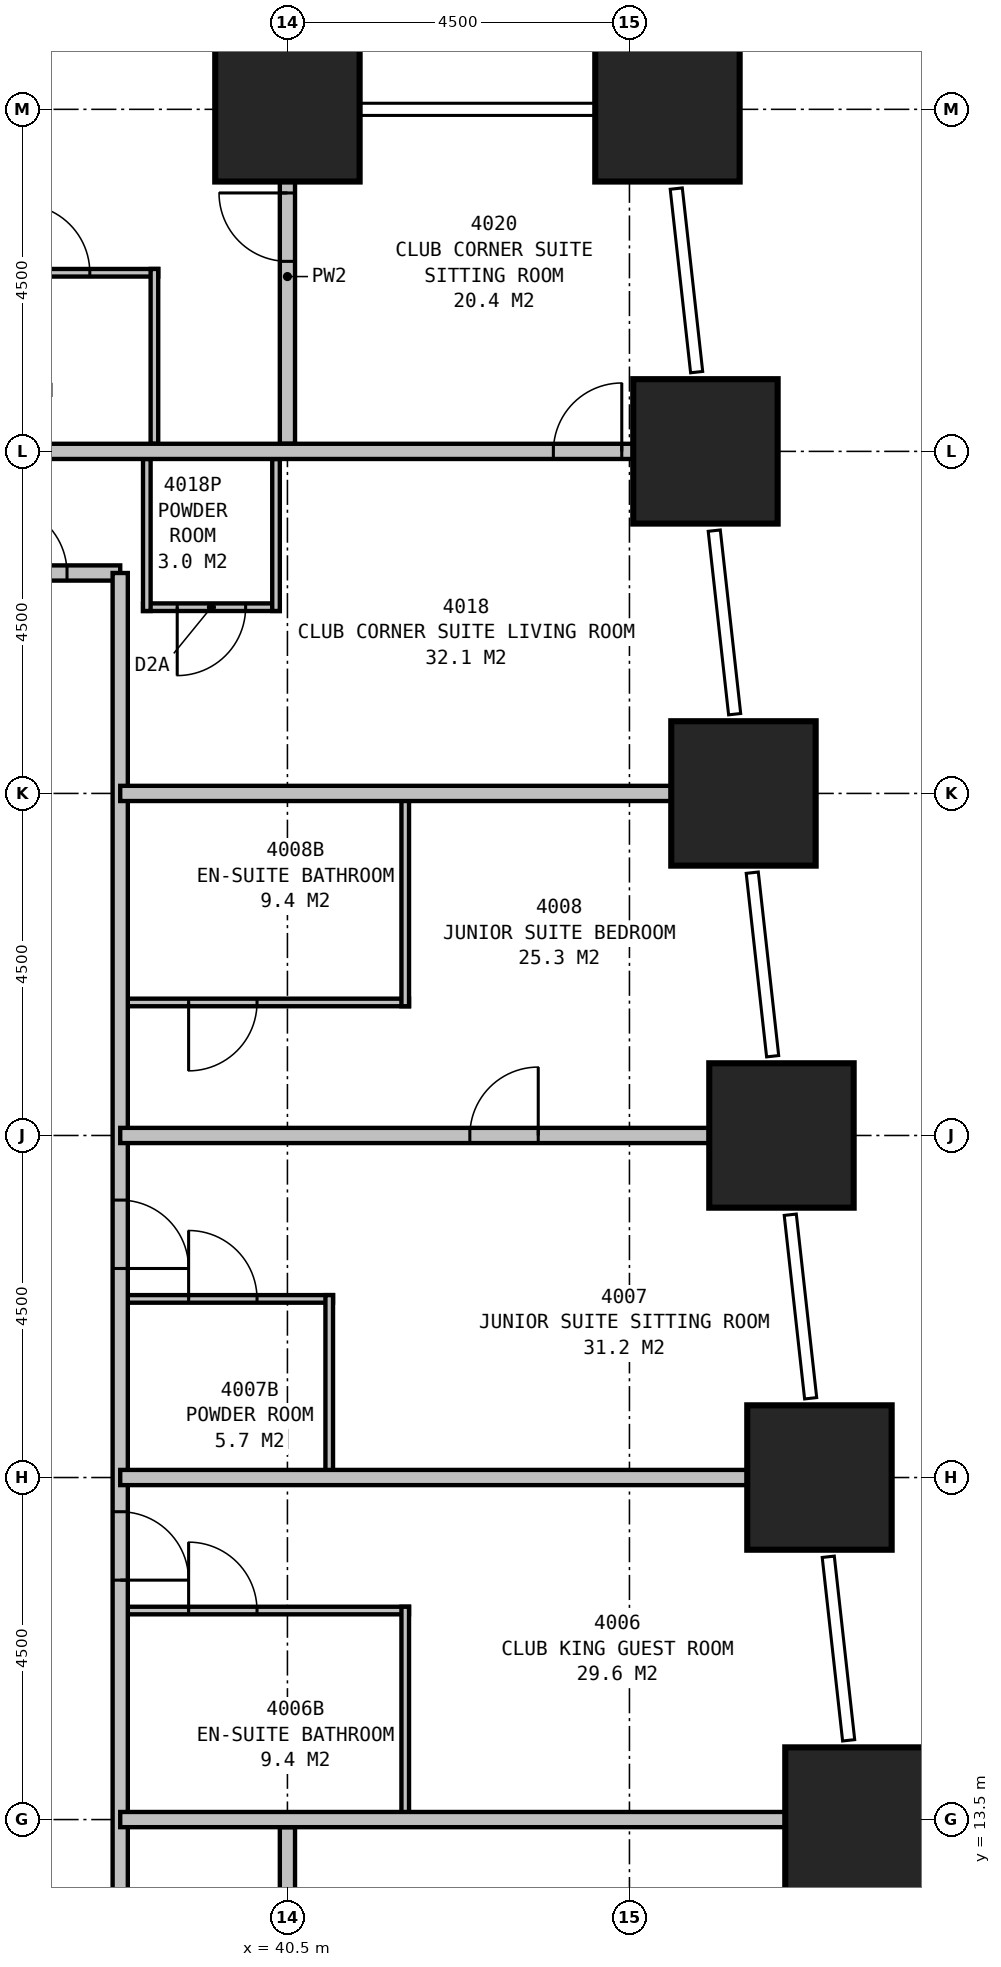
"""IFC4 building model, lengths in metres.
Left out: names, types, materials, properties, quantities, classifications, styles, units other than length and angle.
Written with IfcOpenShell. Run it as: python <this file> out.ifc"""

import sys

from ifc_helpers import new_model, si_unit, direction, frame, frame_2d, origin, origin_2d, place, context, subcontext, project, spatial, rectangle, extrude, element, fill, save


model = new_model("IFC4")
c1 = context("Model", 3, precision=1e-05, world=origin(), true_north=direction((0.0, 1.0)))
c2 = subcontext(c1, "Body", "Model", "MODEL_VIEW")
j1 = project(units=[si_unit("LENGTHUNIT", "METRE"), si_unit("PLANEANGLEUNIT", "RADIAN")], contexts=[c1])
p1 = place(None, origin())
s1 = spatial("IfcSite", under=j1, at=p1, CompositionType="ELEMENT")
p2 = place(p1, origin())
s2 = spatial("IfcBuilding", under=s1, at=p2, CompositionType="ELEMENT")
p3 = place(p2, frame((0.0, 0.0, 157.9)))
s3 = spatial("IfcBuildingStorey", under=s2, at=p3, CompositionType="ELEMENT", Elevation=157.9)
for number, where, z_axis, x_axis in (
    (1, (48.0, 13.5, 0.0), (0.0, 0.0, 1.0), (1.0, 0.0, 0.0)),
    (2, (47.5, 18.0, 0.0), (0.0, 0.0, 1.0), (1.0, 0.0, 0.0)),
    (3, (47.0, 22.5, 0.0), (0.0, 0.0, 1.0), (1.0, 0.0, 0.0)),
    (4, (46.5, 27.0, 0.0), (0.0, 0.0, 1.0), (1.0, 0.0, 0.0)),
    (5, (46.0, 31.5, 0.0), (0.0, 0.0, 1.0), (1.0, 0.0, 0.0)),
    (6, (45.5, 36.0, 0.0), (0.0, 0.0, 1.0), (1.0, 0.0, 0.0)),
    (7, (40.5, 36.0, 0.0), (0.0, 0.0, 1.0), (1.0, 0.0, 0.0)),
):
    element("IfcColumn", number, at=place(p3, frame(where, z_axis=z_axis, x_axis=x_axis)), inside=s3, PredefinedType="COLUMN", context=c2, shape_type="SweptSolid", body=[
        extrude(rectangle(XDim=1.9, YDim=1.9, at=origin_2d()), origin(), (0.0, 0.0, 1.0), 4.5),
    ])
p4 = place(p3, frame((11.2, 29.9, 0.0), z_axis=(0.0, 0.0, 1.0), x_axis=(1.0, 0.0, 0.0)))
e8 = element("IfcWall", 8, at=p4, inside=s3, PredefinedType="PARTITIONING", context=c2, shape_type="SweptSolid", body=[
    extrude(rectangle(XDim=27.1, YDim=0.2, at=frame_2d((13.55, 0.0))), origin(), (0.0, 0.0, 1.0), 4.25),
])
p5 = place(p4, frame((6.45, 0.0, 0.0), z_axis=(0.0, 0.0, 1.0), x_axis=(-1.0, 0.0, 0.0)))
e9 = element("IfcOpeningElement", 9, at=p5, cuts=e8, PredefinedType="OPENING", context=c2, shape_type="SweptSolid", body=[
    extrude(rectangle(XDim=1.0, YDim=2.1, at=frame_2d((0.5, 1.05))), frame((0.0, 0.11, 0.0), z_axis=(0.0, -1.0, 0.0), x_axis=(1.0, 0.0, 0.0)), (0.0, 0.0, 1.0), 0.22),
])
p6 = place(p4, frame((25.5, 0.0, 0.0)))
e10 = element("IfcOpeningElement", 10, at=p6, cuts=e8, PredefinedType="OPENING", context=c2, shape_type="SweptSolid", body=[
    extrude(rectangle(XDim=0.9, YDim=2.1, at=frame_2d((0.45, 1.05))), frame((0.0, 0.11, 0.0), z_axis=(0.0, -1.0, 0.0), x_axis=(1.0, 0.0, 0.0)), (0.0, 0.0, 1.0), 0.22),
])
p7 = place(p4, frame((0.7, 0.0, 0.0)))
e11 = element("IfcOpeningElement", 11, at=p7, cuts=e8, PredefinedType="OPENING", context=c2, shape_type="SweptSolid", body=[
    extrude(rectangle(XDim=0.9, YDim=2.1, at=frame_2d((0.45, 1.05))), frame((0.0, 0.11, 0.0), z_axis=(0.0, -1.0, 0.0), x_axis=(1.0, 0.0, 0.0)), (0.0, 0.0, 1.0), 0.22),
])
p8 = place(p3, frame((38.3, 11.2, 0.0), z_axis=(0.0, 0.0, 1.0), x_axis=(0.0, 1.0, 0.0)))
e12 = element("IfcWall", 12, at=p8, inside=s3, PredefinedType="PARTITIONING", context=c2, shape_type="SweptSolid", body=[
    extrude(rectangle(XDim=18.7, YDim=0.2, at=frame_2d((9.35, 0.0))), origin(), (0.0, 0.0, 1.0), 4.25),
])
p9 = place(p8, frame((6.35, 0.0, 0.0), z_axis=(0.0, 0.0, 1.0), x_axis=(-1.0, 0.0, 0.0)))
e13 = element("IfcOpeningElement", 13, at=p9, cuts=e12, PredefinedType="OPENING", context=c2, shape_type="SweptSolid", body=[
    extrude(rectangle(XDim=0.9, YDim=2.1, at=frame_2d((0.45, 1.05))), frame((0.0, 0.11, 0.0), z_axis=(0.0, -1.0, 0.0), x_axis=(1.0, 0.0, 0.0)), (0.0, 0.0, 1.0), 0.22),
])
p10 = place(p8, frame((10.45, 0.0, 0.0), z_axis=(0.0, 0.0, 1.0), x_axis=(-1.0, 0.0, 0.0)))
e14 = element("IfcOpeningElement", 14, at=p10, cuts=e12, PredefinedType="OPENING", context=c2, shape_type="SweptSolid", body=[
    extrude(rectangle(XDim=0.9, YDim=2.1, at=frame_2d((0.45, 1.05))), frame((0.0, 0.11, 0.0), z_axis=(0.0, -1.0, 0.0), x_axis=(1.0, 0.0, 0.0)), (0.0, 0.0, 1.0), 0.22),
])
p11 = place(p3, frame((38.3, 18.0, 0.0), z_axis=(0.0, 0.0, 1.0), x_axis=(1.0, 0.0, 0.0)))
e15 = element("IfcWall", 15, at=p11, inside=s3, PredefinedType="PARTITIONING", context=c2, shape_type="SweptSolid", body=[
    extrude(rectangle(XDim=9.199, YDim=0.2, at=frame_2d((4.6, 0.0))), origin(), (0.0, 0.0, 1.0), 3.25),
])
p12 = place(p3, frame((38.3, 22.5, 0.0), z_axis=(0.0, 0.0, 1.0), x_axis=(1.0, 0.0, 0.0)))
e16 = element("IfcWall", 16, at=p12, inside=s3, PredefinedType="PARTITIONING", context=c2, shape_type="SweptSolid", body=[
    extrude(rectangle(XDim=8.699, YDim=0.2, at=frame_2d((4.35, 0.0))), origin(), (0.0, 0.0, 1.0), 3.25),
])
p13 = place(p12, frame((4.6, 0.0, 0.0)))
e17 = element("IfcOpeningElement", 17, at=p13, cuts=e16, PredefinedType="OPENING", context=c2, shape_type="SweptSolid", body=[
    extrude(rectangle(XDim=0.9, YDim=2.1, at=frame_2d((0.45, 1.05))), frame((0.0, 0.11, 0.0), z_axis=(0.0, -1.0, 0.0), x_axis=(1.0, 0.0, 0.0)), (0.0, 0.0, 1.0), 0.22),
])
p14 = place(p3, frame((42.05, 13.5, 0.0), z_axis=(0.0, 0.0, 1.0), x_axis=(0.0, 1.0, 0.0)))
e18 = element("IfcWall", 18, at=p14, inside=s3, PredefinedType="PLUMBINGWALL", context=c2, shape_type="SweptSolid", body=[
    extrude(rectangle(XDim=2.8, YDim=0.1, at=frame_2d((1.4, 0.0))), origin(), (0.0, 0.0, 1.0), 4.25),
])
p15 = place(p3, frame((38.3, 16.25, 0.0), z_axis=(0.0, 0.0, 1.0), x_axis=(1.0, 0.0, 0.0)))
e19 = element("IfcWall", 19, at=p15, inside=s3, PredefinedType="PLUMBINGWALL", context=c2, shape_type="SweptSolid", body=[
    extrude(rectangle(XDim=3.8, YDim=0.1, at=frame_2d((1.9, 0.0))), origin(), (0.0, 0.0, 1.0), 4.25),
])
p16 = place(p15, frame((0.9, 0.0, 0.0)))
e20 = element("IfcOpeningElement", 20, at=p16, cuts=e19, PredefinedType="OPENING", context=c2, shape_type="SweptSolid", body=[
    extrude(rectangle(XDim=0.9, YDim=2.1, at=frame_2d((0.45, 1.05))), frame((0.0, 0.06, 0.0), z_axis=(0.0, -1.0, 0.0), x_axis=(1.0, 0.0, 0.0)), (0.0, 0.0, 1.0), 0.12),
])
p17 = place(p3, frame((41.05, 18.0, 0.0), z_axis=(0.0, 0.0, 1.0), x_axis=(0.0, 1.0, 0.0)))
e21 = element("IfcWall", 21, at=p17, inside=s3, PredefinedType="PLUMBINGWALL", context=c2, shape_type="SweptSolid", body=[
    extrude(rectangle(XDim=2.4, YDim=0.1, at=frame_2d((1.2, 0.0))), origin(), (0.0, 0.0, 1.0), 4.25),
])
p18 = place(p3, frame((38.3, 20.35, 0.0), z_axis=(0.0, 0.0, 1.0), x_axis=(1.0, 0.0, 0.0)))
e22 = element("IfcWall", 22, at=p18, inside=s3, PredefinedType="PLUMBINGWALL", context=c2, shape_type="SweptSolid", body=[
    extrude(rectangle(XDim=2.8, YDim=0.1, at=frame_2d((1.4, 0.0))), origin(), (0.0, 0.0, 1.0), 4.25),
])
p19 = place(p18, frame((0.9, 0.0, 0.0)))
e23 = element("IfcOpeningElement", 23, at=p19, cuts=e22, PredefinedType="OPENING", context=c2, shape_type="SweptSolid", body=[
    extrude(rectangle(XDim=0.9, YDim=2.1, at=frame_2d((0.45, 1.05))), frame((0.0, 0.06, 0.0), z_axis=(0.0, -1.0, 0.0), x_axis=(1.0, 0.0, 0.0)), (0.0, 0.0, 1.0), 0.12),
])
p20 = place(p3, frame((42.05, 24.2, 0.0), z_axis=(0.0, 0.0, 1.0), x_axis=(0.0, 1.0, 0.0)))
e24 = element("IfcWall", 24, at=p20, inside=s3, PredefinedType="PLUMBINGWALL", context=c2, shape_type="SweptSolid", body=[
    extrude(rectangle(XDim=2.8, YDim=0.1, at=frame_2d((1.4, 0.0))), origin(), (0.0, 0.0, 1.0), 4.25),
])
p21 = place(p3, frame((38.3, 24.25, 0.0), z_axis=(0.0, 0.0, 1.0), x_axis=(1.0, 0.0, 0.0)))
e25 = element("IfcWall", 25, at=p21, inside=s3, PredefinedType="PLUMBINGWALL", context=c2, shape_type="SweptSolid", body=[
    extrude(rectangle(XDim=3.8, YDim=0.1, at=frame_2d((1.9, 0.0))), origin(), (0.0, 0.0, 1.0), 4.25),
])
p22 = place(p21, frame((1.8, 0.0, 0.0), z_axis=(0.0, 0.0, 1.0), x_axis=(-1.0, 0.0, 0.0)))
e26 = element("IfcOpeningElement", 26, at=p22, cuts=e25, PredefinedType="OPENING", context=c2, shape_type="SweptSolid", body=[
    extrude(rectangle(XDim=0.9, YDim=2.1, at=frame_2d((0.45, 1.05))), frame((0.0, 0.06, 0.0), z_axis=(0.0, -1.0, 0.0), x_axis=(1.0, 0.0, 0.0)), (0.0, 0.0, 1.0), 0.12),
])
p23 = place(p3, frame((38.3, 13.5, 0.0), z_axis=(0.0, 0.0, 1.0), x_axis=(1.0, 0.0, 0.0)))
e27 = element("IfcWall", 27, at=p23, inside=s3, PredefinedType="PARTITIONING", context=c2, shape_type="SweptSolid", body=[
    extrude(rectangle(XDim=9.921, YDim=0.2, at=frame_2d((4.96, 0.0))), origin(), (0.0, 0.0, 1.0), 2.95),
])
p24 = place(p3, frame((40.5, 4.6, 0.0), z_axis=(0.0, 0.0, 1.0), x_axis=(0.0, 1.0, 0.0)))
e28 = element("IfcWall", 28, at=p24, inside=s3, PredefinedType="PARTITIONING", context=c2, shape_type="SweptSolid", body=[
    extrude(rectangle(XDim=8.8, YDim=0.2, at=frame_2d((4.4, 0.0))), origin(), (0.0, 0.0, 1.0), 3.25),
])
p25 = place(p24, frame((4.05, 0.0, 0.0)))
e29 = element("IfcOpeningElement", 29, at=p25, cuts=e28, PredefinedType="OPENING", context=c2, shape_type="SweptSolid", body=[
    extrude(rectangle(XDim=0.9, YDim=2.1, at=frame_2d((0.45, 1.05))), frame((0.0, 0.11, 0.0), z_axis=(0.0, -1.0, 0.0), x_axis=(1.0, 0.0, 0.0)), (0.0, 0.0, 1.0), 0.22),
])
p26 = place(p3, frame((38.3, 27.0, 0.0), z_axis=(0.0, 0.0, 1.0), x_axis=(1.0, 0.0, 0.0)))
e30 = element("IfcWall", 30, at=p26, inside=s3, PredefinedType="PARTITIONING", context=c2, shape_type="SweptSolid", body=[
    extrude(rectangle(XDim=7.977, YDim=0.2, at=frame_2d((3.988, 0.0))), origin(), (0.0, 0.0, 1.0), 2.95),
])
p27 = place(p3, frame((35.9, 31.5, 0.0), z_axis=(0.0, 0.0, 1.0), x_axis=(1.0, 0.0, 0.0)))
e31 = element("IfcWall", 31, at=p27, inside=s3, PredefinedType="PARTITIONING", context=c2, shape_type="SweptSolid", body=[
    extrude(rectangle(XDim=10.099, YDim=0.2, at=frame_2d((5.05, 0.0))), origin(), (0.0, 0.0, 1.0), 4.25),
])
p28 = place(p27, frame((8.099, 0.0, 0.0)))
e32 = element("IfcOpeningElement", 32, at=p28, cuts=e31, PredefinedType="OPENING", context=c2, shape_type="SweptSolid", body=[
    extrude(rectangle(XDim=0.9, YDim=2.1, at=frame_2d((0.45, 1.05))), frame((0.0, 0.11, 0.0), z_axis=(0.0, -1.0, 0.0), x_axis=(1.0, 0.0, 0.0)), (0.0, 0.0, 1.0), 0.22),
])
p29 = place(p3, frame((40.35, 31.4, 0.0), z_axis=(0.0, 0.0, 1.0), x_axis=(0.0, -1.0, 0.0)))
e33 = element("IfcWall", 33, at=p29, inside=s3, PredefinedType="PLUMBINGWALL", context=c2, shape_type="SweptSolid", body=[
    extrude(rectangle(XDim=2.0, YDim=0.1, at=frame_2d((1.0, 0.0))), origin(), (0.0, 0.0, 1.0), 3.25),
])
p30 = place(p3, frame((38.65, 31.4, 0.0), z_axis=(0.0, 0.0, 1.0), x_axis=(0.0, -1.0, 0.0)))
e34 = element("IfcWall", 34, at=p30, inside=s3, PredefinedType="PLUMBINGWALL", context=c2, shape_type="SweptSolid", body=[
    extrude(rectangle(XDim=2.0, YDim=0.1, at=frame_2d((1.0, 0.0))), origin(), (0.0, 0.0, 1.0), 4.25),
])
p31 = place(p3, frame((38.6, 29.45, 0.0), z_axis=(0.0, 0.0, 1.0), x_axis=(1.0, 0.0, 0.0)))
e35 = element("IfcWall", 35, at=p31, inside=s3, PredefinedType="PLUMBINGWALL", context=c2, shape_type="SweptSolid", body=[
    extrude(rectangle(XDim=1.8, YDim=0.1, at=frame_2d((0.9, 0.0))), origin(), (0.0, 0.0, 1.0), 4.25),
])
p32 = place(p31, frame((1.35, 0.0, 0.0), z_axis=(0.0, 0.0, 1.0), x_axis=(-1.0, 0.0, 0.0)))
e36 = element("IfcOpeningElement", 36, at=p32, cuts=e35, PredefinedType="OPENING", context=c2, shape_type="SweptSolid", body=[
    extrude(rectangle(XDim=0.9, YDim=2.1, at=frame_2d((0.45, 1.05))), frame((0.0, 0.06, 0.0), z_axis=(0.0, -1.0, 0.0), x_axis=(1.0, 0.0, 0.0)), (0.0, 0.0, 1.0), 0.12),
])
p33 = place(p3, frame((40.5, 31.6, 0.0), z_axis=(0.0, 0.0, 1.0), x_axis=(0.0, 1.0, 0.0)))
e37 = element("IfcWall", 37, at=p33, inside=s3, PredefinedType="PARTITIONING", context=c2, shape_type="SweptSolid", body=[
    extrude(rectangle(XDim=4.4, YDim=0.2, at=frame_2d((2.2, 0.0))), origin(), (0.0, 0.0, 1.0), 3.25),
])
p34 = place(p33, frame((2.4, 0.0, 0.0)))
e38 = element("IfcOpeningElement", 38, at=p34, cuts=e37, PredefinedType="OPENING", context=c2, shape_type="SweptSolid", body=[
    extrude(rectangle(XDim=0.9, YDim=2.1, at=frame_2d((0.45, 1.05))), frame((0.0, 0.11, 0.0), z_axis=(0.0, -1.0, 0.0), x_axis=(1.0, 0.0, 0.0)), (0.0, 0.0, 1.0), 0.22),
])
p35 = place(p3, frame((38.75, 31.6, 0.0), z_axis=(0.0, 0.0, 1.0), x_axis=(0.0, 1.0, 0.0)))
e39 = element("IfcWall", 39, at=p35, inside=s3, PredefinedType="PLUMBINGWALL", context=c2, shape_type="SweptSolid", body=[
    extrude(rectangle(XDim=2.3, YDim=0.1, at=frame_2d((1.15, 0.0))), origin(), (0.0, 0.0, 1.0), 4.25),
])
p36 = place(p3, frame((36.1, 33.85, 0.0), z_axis=(0.0, 0.0, 1.0), x_axis=(1.0, 0.0, 0.0)))
e40 = element("IfcWall", 40, at=p36, inside=s3, PredefinedType="PLUMBINGWALL", context=c2, shape_type="SweptSolid", body=[
    extrude(rectangle(XDim=2.7, YDim=0.1, at=frame_2d((1.35, 0.0))), origin(), (0.0, 0.0, 1.0), 4.25),
])
p37 = place(p36, frame((0.9, 0.0, 0.0)))
e41 = element("IfcOpeningElement", 41, at=p37, cuts=e40, PredefinedType="OPENING", context=c2, shape_type="SweptSolid", body=[
    extrude(rectangle(XDim=0.9, YDim=2.1, at=frame_2d((0.45, 1.05))), frame((0.0, 0.06, 0.0), z_axis=(0.0, -1.0, 0.0), x_axis=(1.0, 0.0, 0.0)), (0.0, 0.0, 1.0), 0.12),
])
p38 = place(p6, origin())
e42 = element("IfcDoor", 42, at=p38, inside=s3, OperationType="SINGLE_SWING_LEFT", PredefinedType="DOOR", context=c2, shape_type="SweptSolid", body=[
    extrude(rectangle(XDim=0.9, YDim=2.1, at=frame_2d((0.45, 1.05))), frame((0.0, 0.025, 0.0), z_axis=(0.0, -1.0, 0.0), x_axis=(1.0, 0.0, 0.0)), (0.0, 0.0, 1.0), 0.05),
])
fill(e10, e42)
p39 = place(p9, origin())
e43 = element("IfcDoor", 43, at=p39, inside=s3, OperationType="SINGLE_SWING_RIGHT", PredefinedType="DOOR", context=c2, shape_type="SweptSolid", body=[
    extrude(rectangle(XDim=0.9, YDim=2.1, at=frame_2d((0.45, 1.05))), frame((0.0, 0.025, 0.0), z_axis=(0.0, -1.0, 0.0), x_axis=(1.0, 0.0, 0.0)), (0.0, 0.0, 1.0), 0.05),
])
fill(e13, e43)
p40 = place(p10, origin())
e44 = element("IfcDoor", 44, at=p40, inside=s3, OperationType="SINGLE_SWING_RIGHT", PredefinedType="DOOR", context=c2, shape_type="SweptSolid", body=[
    extrude(rectangle(XDim=0.9, YDim=2.1, at=frame_2d((0.45, 1.05))), frame((0.0, 0.025, 0.0), z_axis=(0.0, -1.0, 0.0), x_axis=(1.0, 0.0, 0.0)), (0.0, 0.0, 1.0), 0.05),
])
fill(e14, e44)
p41 = place(p13, origin())
e45 = element("IfcDoor", 45, at=p41, inside=s3, OperationType="SINGLE_SWING_RIGHT", PredefinedType="DOOR", context=c2, shape_type="SweptSolid", body=[
    extrude(rectangle(XDim=0.9, YDim=2.1, at=frame_2d((0.45, 1.05))), frame((0.0, 0.025, 0.0), z_axis=(0.0, -1.0, 0.0), x_axis=(1.0, 0.0, 0.0)), (0.0, 0.0, 1.0), 0.05),
])
fill(e17, e45)
p42 = place(p16, origin())
e46 = element("IfcDoor", 46, at=p42, inside=s3, OperationType="SINGLE_SWING_LEFT", PredefinedType="DOOR", context=c2, shape_type="SweptSolid", body=[
    extrude(rectangle(XDim=0.9, YDim=2.1, at=frame_2d((0.45, 1.05))), frame((0.0, 0.025, 0.0), z_axis=(0.0, -1.0, 0.0), x_axis=(1.0, 0.0, 0.0)), (0.0, 0.0, 1.0), 0.05),
])
fill(e20, e46)
p43 = place(p19, origin())
e47 = element("IfcDoor", 47, at=p43, inside=s3, OperationType="SINGLE_SWING_LEFT", PredefinedType="DOOR", context=c2, shape_type="SweptSolid", body=[
    extrude(rectangle(XDim=0.9, YDim=2.1, at=frame_2d((0.45, 1.05))), frame((0.0, 0.025, 0.0), z_axis=(0.0, -1.0, 0.0), x_axis=(1.0, 0.0, 0.0)), (0.0, 0.0, 1.0), 0.05),
])
fill(e23, e47)
p44 = place(p22, origin())
e48 = element("IfcDoor", 48, at=p44, inside=s3, OperationType="SINGLE_SWING_RIGHT", PredefinedType="DOOR", context=c2, shape_type="SweptSolid", body=[
    extrude(rectangle(XDim=0.9, YDim=2.1, at=frame_2d((0.45, 1.05))), frame((0.0, 0.025, 0.0), z_axis=(0.0, -1.0, 0.0), x_axis=(1.0, 0.0, 0.0)), (0.0, 0.0, 1.0), 0.05),
])
fill(e26, e48)
p45 = place(p28, origin())
e49 = element("IfcDoor", 49, at=p45, inside=s3, OperationType="SINGLE_SWING_RIGHT", PredefinedType="DOOR", context=c2, shape_type="SweptSolid", body=[
    extrude(rectangle(XDim=0.9, YDim=2.1, at=frame_2d((0.45, 1.05))), frame((0.0, 0.025, 0.0), z_axis=(0.0, -1.0, 0.0), x_axis=(1.0, 0.0, 0.0)), (0.0, 0.0, 1.0), 0.05),
])
fill(e32, e49)
p46 = place(p32, origin())
e50 = element("IfcDoor", 50, at=p46, inside=s3, OperationType="SINGLE_SWING_RIGHT", PredefinedType="DOOR", context=c2, shape_type="SweptSolid", body=[
    extrude(rectangle(XDim=0.9, YDim=2.1, at=frame_2d((0.45, 1.05))), frame((0.0, 0.025, 0.0), z_axis=(0.0, -1.0, 0.0), x_axis=(1.0, 0.0, 0.0)), (0.0, 0.0, 1.0), 0.05),
])
fill(e36, e50)
p47 = place(p34, origin())
e51 = element("IfcDoor", 51, at=p47, inside=s3, OperationType="SINGLE_SWING_RIGHT", PredefinedType="DOOR", context=c2, shape_type="SweptSolid", body=[
    extrude(rectangle(XDim=0.9, YDim=2.1, at=frame_2d((0.45, 1.05))), frame((0.0, 0.025, 0.0), z_axis=(0.0, -1.0, 0.0), x_axis=(1.0, 0.0, 0.0)), (0.0, 0.0, 1.0), 0.05),
])
fill(e38, e51)
p48 = place(p37, origin())
e52 = element("IfcDoor", 52, at=p48, inside=s3, OperationType="SINGLE_SWING_LEFT", PredefinedType="DOOR", context=c2, shape_type="SweptSolid", body=[
    extrude(rectangle(XDim=0.9, YDim=2.1, at=frame_2d((0.45, 1.05))), frame((0.0, 0.025, 0.0), z_axis=(0.0, -1.0, 0.0), x_axis=(1.0, 0.0, 0.0)), (0.0, 0.0, 1.0), 0.05),
])
fill(e41, e52)
save(model, sys.argv[1])
